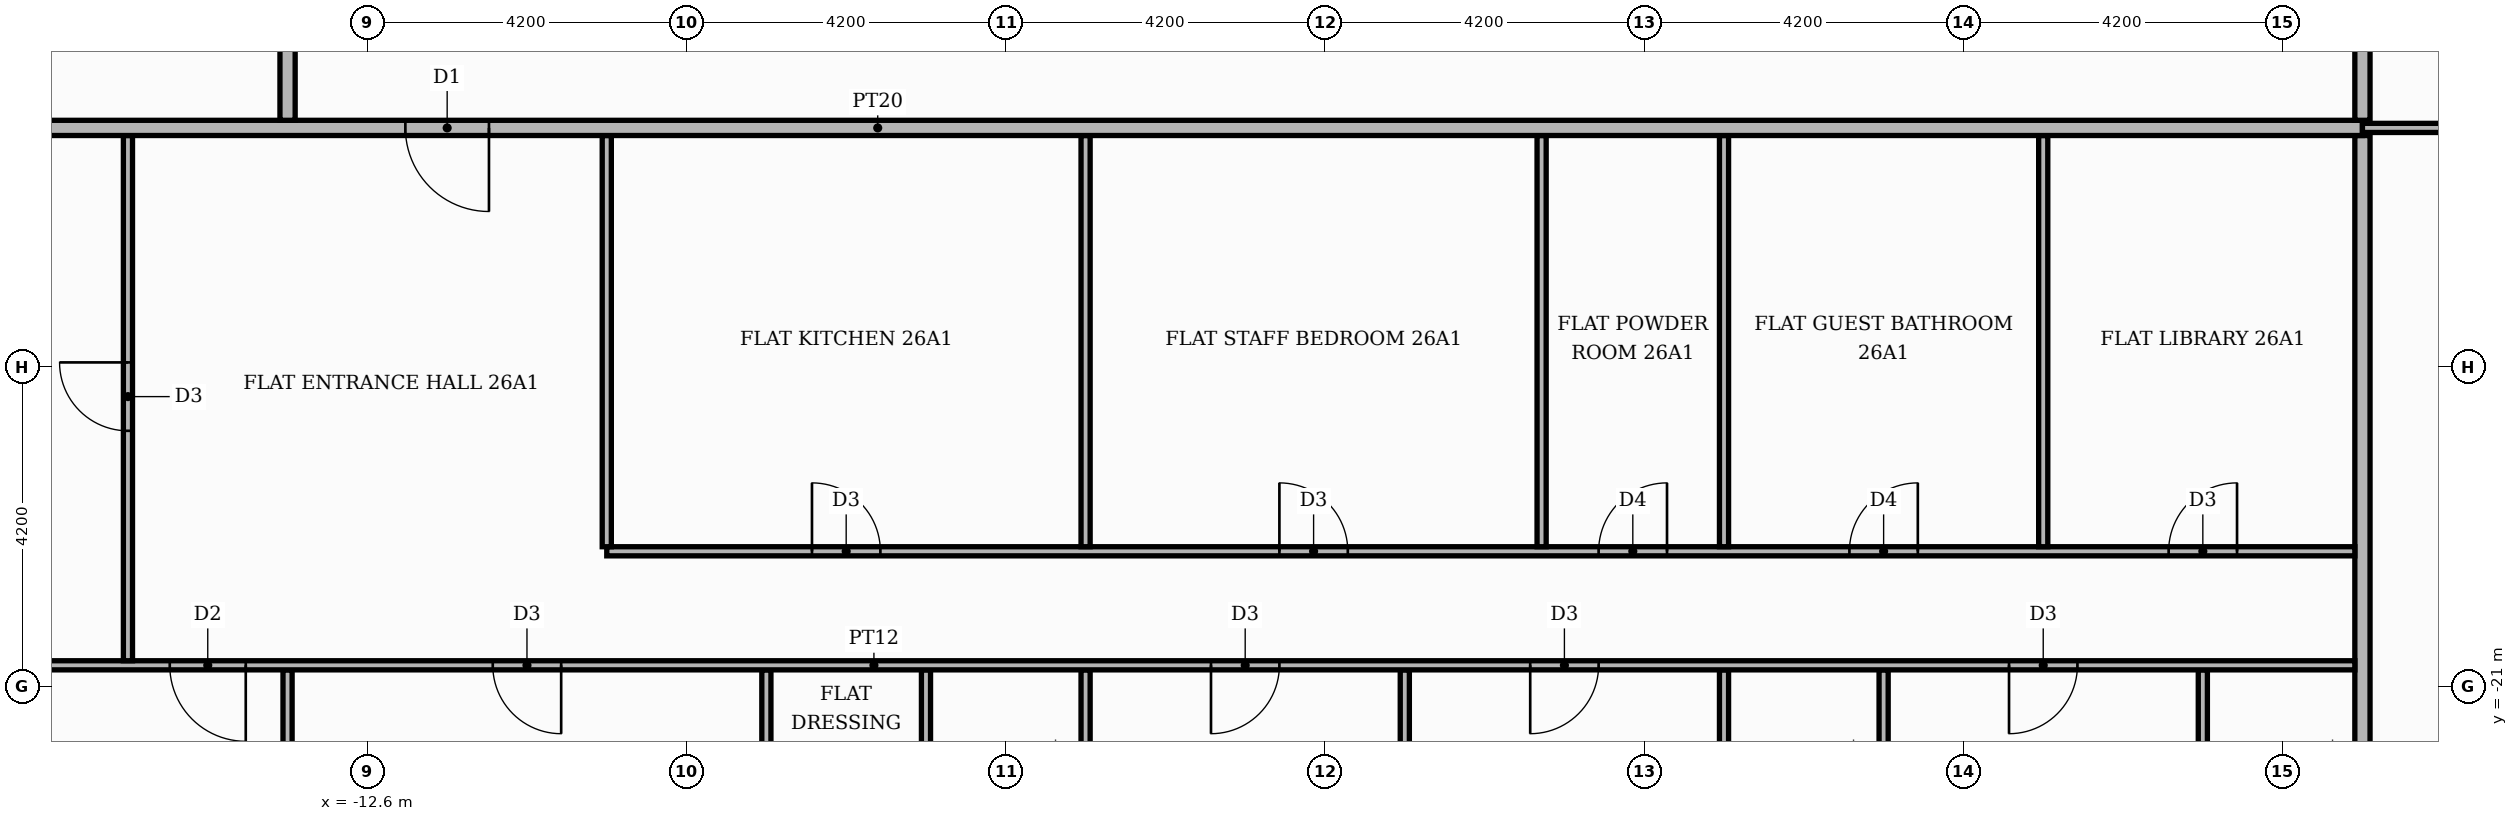
"""IFC4 building model, lengths in metres.
Left out: names, types, materials, properties, quantities, classifications, styles, units other than length and angle.
Written with IfcOpenShell. Run it as: python <this file> out.ifc"""

import sys

from ifc_helpers import new_model, si_unit, direction, frame, frame_2d, origin, place, context, subcontext, project, spatial, rectangle, extrude, element, fill, save


model = new_model("IFC4")
c1 = context("Model", 3, precision=1e-05, world=origin(), true_north=direction((0.0, 1.0)))
c2 = subcontext(c1, "Body", "Model", "MODEL_VIEW")
j1 = project(units=[si_unit("LENGTHUNIT", "METRE"), si_unit("PLANEANGLEUNIT", "RADIAN")], contexts=[c1])
p1 = place(None, origin())
s1 = spatial("IfcSite", under=j1, at=p1, CompositionType="ELEMENT")
p2 = place(p1, origin())
s2 = spatial("IfcBuilding", under=s1, at=p2, CompositionType="ELEMENT")
p3 = place(p2, frame((0.0, 0.0, 110.4)))
s3 = spatial("IfcBuildingStorey", under=s2, at=p3, CompositionType="ELEMENT", Elevation=110.4)
p4 = place(p3, frame((-13.65, -25.42, 0.0), z_axis=(0.0, 0.0, 1.0), x_axis=(0.0, 1.0, 0.0)))
e1 = element("IfcWall", 1, at=p4, inside=s3, PredefinedType="PARTITIONING", context=c2, shape_type="SweptSolid", body=[
    extrude(rectangle(XDim=4.64, YDim=0.12, at=frame_2d((2.32, 0.0))), origin(), (0.0, 0.0, 1.0), 3.48),
])
p5 = place(p3, frame((-7.35, -25.42, 0.0), z_axis=(0.0, 0.0, 1.0), x_axis=(0.0, 1.0, 0.0)))
e2 = element("IfcWall", 2, at=p5, inside=s3, PredefinedType="PARTITIONING", context=c2, shape_type="SweptSolid", body=[
    extrude(rectangle(XDim=4.64, YDim=0.12, at=frame_2d((2.32, 0.0))), origin(), (0.0, 0.0, 1.0), 3.48),
])
p6 = place(p5, frame((1.75, 0.0, 0.0)))
e3 = element("IfcOpeningElement", 3, at=p6, cuts=e2, PredefinedType="OPENING", context=c2, shape_type="SweptSolid", body=[
    extrude(rectangle(XDim=0.9, YDim=2.1, at=frame_2d((0.45, 1.05))), frame((0.0, 0.07, 0.0), z_axis=(0.0, -1.0, 0.0), x_axis=(1.0, 0.0, 0.0)), (0.0, 0.0, 1.0), 0.14),
])
p7 = place(p3, frame((-5.25, -25.42, 0.0), z_axis=(0.0, 0.0, 1.0), x_axis=(0.0, 1.0, 0.0)))
e4 = element("IfcWall", 4, at=p7, inside=s3, PredefinedType="PARTITIONING", context=c2, shape_type="SweptSolid", body=[
    extrude(rectangle(XDim=4.64, YDim=0.12, at=frame_2d((2.32, 0.0))), origin(), (0.0, 0.0, 1.0), 3.48),
])
p8 = place(p7, frame((1.75, 0.0, 0.0)))
e5 = element("IfcOpeningElement", 5, at=p8, cuts=e4, PredefinedType="OPENING", context=c2, shape_type="SweptSolid", body=[
    extrude(rectangle(XDim=0.9, YDim=2.1, at=frame_2d((0.45, 1.05))), frame((0.0, 0.07, 0.0), z_axis=(0.0, -1.0, 0.0), x_axis=(1.0, 0.0, 0.0)), (0.0, 0.0, 1.0), 0.14),
])
for number, where, z_axis, x_axis in (
    (6, (-3.15, -25.42, 0.0), (0.0, 0.0, 1.0), (0.0, 1.0, 0.0)),
    (7, (1.05, -25.42, 0.0), (0.0, 0.0, 1.0), (0.0, 1.0, 0.0)),
):
    element("IfcWall", number, at=place(p3, frame(where, z_axis=z_axis, x_axis=x_axis)), inside=s3, PredefinedType="PARTITIONING", context=c2, shape_type="SweptSolid", body=[
        extrude(rectangle(XDim=4.64, YDim=0.12, at=frame_2d((2.32, 0.0))), origin(), (0.0, 0.0, 1.0), 3.48),
    ])
p9 = place(p3, frame((5.25, -25.42, 0.0), z_axis=(0.0, 0.0, 1.0), x_axis=(0.0, 1.0, 0.0)))
e8 = element("IfcWall", 8, at=p9, inside=s3, PredefinedType="PARTITIONING", context=c2, shape_type="SweptSolid", body=[
    extrude(rectangle(XDim=4.64, YDim=0.12, at=frame_2d((2.32, 0.0))), origin(), (0.0, 0.0, 1.0), 3.48),
])
p10 = place(p9, frame((1.75, 0.0, 0.0)))
e9 = element("IfcOpeningElement", 9, at=p10, cuts=e8, PredefinedType="OPENING", context=c2, shape_type="SweptSolid", body=[
    extrude(rectangle(XDim=0.9, YDim=2.1, at=frame_2d((0.45, 1.05))), frame((0.0, 0.07, 0.0), z_axis=(0.0, -1.0, 0.0), x_axis=(1.0, 0.0, 0.0)), (0.0, 0.0, 1.0), 0.14),
])
p11 = place(p3, frame((7.35, -25.42, 0.0), z_axis=(0.0, 0.0, 1.0), x_axis=(0.0, 1.0, 0.0)))
e10 = element("IfcWall", 10, at=p11, inside=s3, PredefinedType="PARTITIONING", context=c2, shape_type="SweptSolid", body=[
    extrude(rectangle(XDim=4.64, YDim=0.12, at=frame_2d((2.32, 0.0))), origin(), (0.0, 0.0, 1.0), 3.48),
])
p12 = place(p3, frame((11.55, -25.42, 0.0), z_axis=(0.0, 0.0, 1.0), x_axis=(0.0, 1.0, 0.0)))
e11 = element("IfcWall", 11, at=p12, inside=s3, PredefinedType="PARTITIONING", context=c2, shape_type="SweptSolid", body=[
    extrude(rectangle(XDim=4.64, YDim=0.12, at=frame_2d((2.32, 0.0))), origin(), (0.0, 0.0, 1.0), 3.48),
])
p13 = place(p12, frame((1.75, 0.0, 0.0)))
e12 = element("IfcOpeningElement", 12, at=p13, cuts=e11, PredefinedType="OPENING", context=c2, shape_type="SweptSolid", body=[
    extrude(rectangle(XDim=0.9, YDim=2.1, at=frame_2d((0.45, 1.05))), frame((0.0, 0.07, 0.0), z_axis=(0.0, -1.0, 0.0), x_axis=(1.0, 0.0, 0.0)), (0.0, 0.0, 1.0), 0.14),
])
p14 = place(p3, frame((13.65, -25.42, 0.0), z_axis=(0.0, 0.0, 1.0), x_axis=(0.0, 1.0, 0.0)))
e13 = element("IfcWall", 13, at=p14, inside=s3, PredefinedType="PARTITIONING", context=c2, shape_type="SweptSolid", body=[
    extrude(rectangle(XDim=11.67, YDim=0.2, at=frame_2d((5.835, 0.0))), origin(), (0.0, 0.0, 1.0), 3.48),
])
p15 = place(p3, frame((-25.42, -20.72, 0.0), z_axis=(0.0, 0.0, 1.0), x_axis=(1.0, 0.0, 0.0)))
e14 = element("IfcWall", 14, at=p15, inside=s3, PredefinedType="PARTITIONING", context=c2, shape_type="SweptSolid", body=[
    extrude(rectangle(XDim=38.97, YDim=0.12, at=frame_2d((19.485, 0.0))), origin(), (0.0, 0.0, 1.0), 3.48),
])
p16 = place(p15, frame((10.22, 0.0, 0.0)))
e15 = element("IfcOpeningElement", 15, at=p16, cuts=e14, PredefinedType="OPENING", context=c2, shape_type="SweptSolid", body=[
    extrude(rectangle(XDim=1.0, YDim=2.1, at=frame_2d((0.5, 1.05))), frame((0.0, 0.07, 0.0), z_axis=(0.0, -1.0, 0.0), x_axis=(1.0, 0.0, 0.0)), (0.0, 0.0, 1.0), 0.14),
])
p17 = place(p15, frame((14.47, 0.0, 0.0)))
e16 = element("IfcOpeningElement", 16, at=p17, cuts=e14, PredefinedType="OPENING", context=c2, shape_type="SweptSolid", body=[
    extrude(rectangle(XDim=0.9, YDim=2.1, at=frame_2d((0.45, 1.05))), frame((0.0, 0.07, 0.0), z_axis=(0.0, -1.0, 0.0), x_axis=(1.0, 0.0, 0.0)), (0.0, 0.0, 1.0), 0.14),
])
p18 = place(p15, frame((23.92, 0.0, 0.0)))
e17 = element("IfcOpeningElement", 17, at=p18, cuts=e14, PredefinedType="OPENING", context=c2, shape_type="SweptSolid", body=[
    extrude(rectangle(XDim=0.9, YDim=2.1, at=frame_2d((0.45, 1.05))), frame((0.0, 0.07, 0.0), z_axis=(0.0, -1.0, 0.0), x_axis=(1.0, 0.0, 0.0)), (0.0, 0.0, 1.0), 0.14),
])
p19 = place(p15, frame((28.12, 0.0, 0.0)))
e18 = element("IfcOpeningElement", 18, at=p19, cuts=e14, PredefinedType="OPENING", context=c2, shape_type="SweptSolid", body=[
    extrude(rectangle(XDim=0.9, YDim=2.1, at=frame_2d((0.45, 1.05))), frame((0.0, 0.07, 0.0), z_axis=(0.0, -1.0, 0.0), x_axis=(1.0, 0.0, 0.0)), (0.0, 0.0, 1.0), 0.14),
])
p20 = place(p15, frame((34.42, 0.0, 0.0)))
e19 = element("IfcOpeningElement", 19, at=p20, cuts=e14, PredefinedType="OPENING", context=c2, shape_type="SweptSolid", body=[
    extrude(rectangle(XDim=0.9, YDim=2.1, at=frame_2d((0.45, 1.05))), frame((0.0, 0.07, 0.0), z_axis=(0.0, -1.0, 0.0), x_axis=(1.0, 0.0, 0.0)), (0.0, 0.0, 1.0), 0.14),
])
p21 = place(p3, frame((-15.75, -20.66, 0.0), z_axis=(0.0, 0.0, 1.0), x_axis=(0.0, 1.0, 0.0)))
e20 = element("IfcWall", 20, at=p21, inside=s3, PredefinedType="PARTITIONING", context=c2, shape_type="SweptSolid", body=[
    extrude(rectangle(XDim=6.91, YDim=0.12, at=frame_2d((3.455, 0.0))), origin(), (0.0, 0.0, 1.0), 3.48),
])
p22 = place(p21, frame((3.025, 0.0, 0.0)))
e21 = element("IfcOpeningElement", 21, at=p22, cuts=e20, PredefinedType="OPENING", context=c2, shape_type="SweptSolid", body=[
    extrude(rectangle(XDim=0.9, YDim=2.1, at=frame_2d((0.45, 1.05))), frame((0.0, 0.07, 0.0), z_axis=(0.0, -1.0, 0.0), x_axis=(1.0, 0.0, 0.0)), (0.0, 0.0, 1.0), 0.14),
])
p23 = place(p3, frame((-9.45, -19.22, 0.0), z_axis=(0.0, 0.0, 1.0), x_axis=(1.0, 0.0, 0.0)))
e22 = element("IfcWall", 22, at=p23, inside=s3, PredefinedType="PARTITIONING", context=c2, shape_type="SweptSolid", body=[
    extrude(rectangle(XDim=23.0, YDim=0.12, at=frame_2d((11.5, 0.0))), origin(), (0.0, 0.0, 1.0), 3.48),
])
p24 = place(p23, frame((2.7, 0.0, 0.0)))
e23 = element("IfcOpeningElement", 23, at=p24, cuts=e22, PredefinedType="OPENING", context=c2, shape_type="SweptSolid", body=[
    extrude(rectangle(XDim=0.9, YDim=2.1, at=frame_2d((0.45, 1.05))), frame((0.0, 0.07, 0.0), z_axis=(0.0, -1.0, 0.0), x_axis=(1.0, 0.0, 0.0)), (0.0, 0.0, 1.0), 0.14),
])
p25 = place(p23, frame((8.85, 0.0, 0.0)))
e24 = element("IfcOpeningElement", 24, at=p25, cuts=e22, PredefinedType="OPENING", context=c2, shape_type="SweptSolid", body=[
    extrude(rectangle(XDim=0.9, YDim=2.1, at=frame_2d((0.45, 1.05))), frame((0.0, 0.07, 0.0), z_axis=(0.0, -1.0, 0.0), x_axis=(1.0, 0.0, 0.0)), (0.0, 0.0, 1.0), 0.14),
])
p26 = place(p23, frame((13.05, 0.0, 0.0)))
e25 = element("IfcOpeningElement", 25, at=p26, cuts=e22, PredefinedType="OPENING", context=c2, shape_type="SweptSolid", body=[
    extrude(rectangle(XDim=0.9, YDim=2.1, at=frame_2d((0.45, 1.05))), frame((0.0, 0.07, 0.0), z_axis=(0.0, -1.0, 0.0), x_axis=(1.0, 0.0, 0.0)), (0.0, 0.0, 1.0), 0.14),
])
p27 = place(p23, frame((16.35, 0.0, 0.0)))
e26 = element("IfcOpeningElement", 26, at=p27, cuts=e22, PredefinedType="OPENING", context=c2, shape_type="SweptSolid", body=[
    extrude(rectangle(XDim=0.9, YDim=2.1, at=frame_2d((0.45, 1.05))), frame((0.0, 0.07, 0.0), z_axis=(0.0, -1.0, 0.0), x_axis=(1.0, 0.0, 0.0)), (0.0, 0.0, 1.0), 0.14),
])
p28 = place(p23, frame((20.55, 0.0, 0.0)))
e27 = element("IfcOpeningElement", 27, at=p28, cuts=e22, PredefinedType="OPENING", context=c2, shape_type="SweptSolid", body=[
    extrude(rectangle(XDim=0.9, YDim=2.1, at=frame_2d((0.45, 1.05))), frame((0.0, 0.07, 0.0), z_axis=(0.0, -1.0, 0.0), x_axis=(1.0, 0.0, 0.0)), (0.0, 0.0, 1.0), 0.14),
])
for number, where, z_axis, x_axis in (
    (28, (-9.45, -19.16, 0.0), (0.0, 0.0, 1.0), (0.0, 1.0, 0.0)),
    (29, (-3.15, -19.16, 0.0), (0.0, 0.0, 1.0), (0.0, 1.0, 0.0)),
    (30, (2.85, -19.16, 0.0), (0.0, 0.0, 1.0), (0.0, 1.0, 0.0)),
    (31, (5.25, -19.16, 0.0), (0.0, 0.0, 1.0), (0.0, 1.0, 0.0)),
    (32, (9.45, -19.16, 0.0), (0.0, 0.0, 1.0), (0.0, 1.0, 0.0)),
):
    element("IfcWall", number, at=place(p3, frame(where, z_axis=z_axis, x_axis=x_axis)), inside=s3, PredefinedType="PARTITIONING", context=c2, shape_type="SweptSolid", body=[
        extrude(rectangle(XDim=5.41, YDim=0.12, at=frame_2d((2.705, 0.0))), origin(), (0.0, 0.0, 1.0), 3.48),
    ])
p29 = place(p3, frame((-25.42, -13.65, 0.0), z_axis=(0.0, 0.0, 1.0), x_axis=(1.0, 0.0, 0.0)))
e33 = element("IfcWall", 33, at=p29, inside=s3, PredefinedType="PARTITIONING", context=c2, shape_type="SweptSolid", body=[
    extrude(rectangle(XDim=39.07, YDim=0.2, at=frame_2d((19.535, 0.0))), origin(), (0.0, 0.0, 1.0), 3.48),
])
p30 = place(p29, frame((13.32, 0.0, 0.0)))
e34 = element("IfcOpeningElement", 34, at=p30, cuts=e33, PredefinedType="OPENING", context=c2, shape_type="SweptSolid", body=[
    extrude(rectangle(XDim=1.1, YDim=2.4, at=frame_2d((0.55, 1.2))), frame((0.0, 0.11, 0.0), z_axis=(0.0, -1.0, 0.0), x_axis=(1.0, 0.0, 0.0)), (0.0, 0.0, 1.0), 0.22),
])
p31 = place(p3, frame((13.65, -13.65, 0.0), z_axis=(0.0, 0.0, 1.0), x_axis=(1.0, 0.0, 0.0)))
e35 = element("IfcWall", 35, at=p31, inside=s3, PredefinedType="PARTITIONING", context=c2, shape_type="SweptSolid", body=[
    extrude(rectangle(XDim=6.77, YDim=0.12, at=frame_2d((3.385, 0.0))), origin(), (0.0, 0.0, 1.0), 3.48),
])
p32 = place(p31, frame((2.935, 0.0, 0.0)))
e36 = element("IfcOpeningElement", 36, at=p32, cuts=e35, PredefinedType="OPENING", context=c2, shape_type="SweptSolid", body=[
    extrude(rectangle(XDim=0.9, YDim=2.1, at=frame_2d((0.45, 1.05))), frame((0.0, 0.07, 0.0), z_axis=(0.0, -1.0, 0.0), x_axis=(1.0, 0.0, 0.0)), (0.0, 0.0, 1.0), 0.14),
])
p33 = place(p3, frame((-13.65, -13.55, 0.0), z_axis=(0.0, 0.0, 1.0), x_axis=(0.0, 1.0, 0.0)))
e37 = element("IfcWall", 37, at=p33, inside=s3, PredefinedType="PARTITIONING", context=c2, shape_type="SweptSolid", body=[
    extrude(rectangle(XDim=18.7, YDim=0.2, at=frame_2d((9.35, 0.0))), origin(), (0.0, 0.0, 1.0), 3.48),
])
p34 = place(p33, frame((14.05, 0.0, 0.0)))
e38 = element("IfcOpeningElement", 38, at=p34, cuts=e37, PredefinedType="OPENING", context=c2, shape_type="SweptSolid", body=[
    extrude(rectangle(XDim=1.1, YDim=2.4, at=frame_2d((0.55, 1.2))), frame((0.0, 0.11, 0.0), z_axis=(0.0, -1.0, 0.0), x_axis=(1.0, 0.0, 0.0)), (0.0, 0.0, 1.0), 0.22),
])
p35 = place(p3, frame((13.65, -13.55, 0.0), z_axis=(0.0, 0.0, 1.0), x_axis=(0.0, 1.0, 0.0)))
e39 = element("IfcWall", 39, at=p35, inside=s3, PredefinedType="PARTITIONING", context=c2, shape_type="SweptSolid", body=[
    extrude(rectangle(XDim=27.1, YDim=0.2, at=frame_2d((13.55, 0.0))), origin(), (0.0, 0.0, 1.0), 3.48),
])
p36 = place(p35, frame((2.5, 0.0, 0.0)))
e40 = element("IfcOpeningElement", 40, at=p36, cuts=e39, PredefinedType="OPENING", context=c2, shape_type="SweptSolid", body=[
    extrude(rectangle(XDim=1.1, YDim=2.4, at=frame_2d((0.55, 1.2))), frame((0.0, 0.11, 0.0), z_axis=(0.0, -1.0, 0.0), x_axis=(1.0, 0.0, 0.0)), (0.0, 0.0, 1.0), 0.22),
])
p37 = place(p30, frame((1.1, 0.0, 0.0), z_axis=(0.0, 0.0, 1.0), x_axis=(-1.0, 0.0, 0.0)))
e41 = element("IfcDoor", 41, at=p37, inside=s3, OperationType="SINGLE_SWING_RIGHT", PredefinedType="DOOR", context=c2, shape_type="SweptSolid", body=[
    extrude(rectangle(XDim=1.1, YDim=2.4, at=frame_2d((0.55, 1.2))), frame((0.0, 0.025, 0.0), z_axis=(0.0, -1.0, 0.0), x_axis=(1.0, 0.0, 0.0)), (0.0, 0.0, 1.0), 0.05),
])
fill(e34, e41)
p38 = place(p22, origin())
e42 = element("IfcDoor", 42, at=p38, inside=s3, OperationType="SINGLE_SWING_RIGHT", PredefinedType="DOOR", context=c2, shape_type="SweptSolid", body=[
    extrude(rectangle(XDim=0.9, YDim=2.1, at=frame_2d((0.45, 1.05))), frame((0.0, 0.025, 0.0), z_axis=(0.0, -1.0, 0.0), x_axis=(1.0, 0.0, 0.0)), (0.0, 0.0, 1.0), 0.05),
])
fill(e21, e42)
p39 = place(p24, origin())
e43 = element("IfcDoor", 43, at=p39, inside=s3, OperationType="SINGLE_SWING_LEFT", PredefinedType="DOOR", context=c2, shape_type="SweptSolid", body=[
    extrude(rectangle(XDim=0.9, YDim=2.1, at=frame_2d((0.45, 1.05))), frame((0.0, 0.025, 0.0), z_axis=(0.0, -1.0, 0.0), x_axis=(1.0, 0.0, 0.0)), (0.0, 0.0, 1.0), 0.05),
])
fill(e23, e43)
p40 = place(p25, origin())
e44 = element("IfcDoor", 44, at=p40, inside=s3, OperationType="SINGLE_SWING_LEFT", PredefinedType="DOOR", context=c2, shape_type="SweptSolid", body=[
    extrude(rectangle(XDim=0.9, YDim=2.1, at=frame_2d((0.45, 1.05))), frame((0.0, 0.025, 0.0), z_axis=(0.0, -1.0, 0.0), x_axis=(1.0, 0.0, 0.0)), (0.0, 0.0, 1.0), 0.05),
])
fill(e24, e44)
p41 = place(p26, origin())
e45 = element("IfcDoor", 45, at=p41, inside=s3, OperationType="SINGLE_SWING_RIGHT", PredefinedType="DOOR", context=c2, shape_type="SweptSolid", body=[
    extrude(rectangle(XDim=0.9, YDim=2.1, at=frame_2d((0.45, 1.05))), frame((0.0, 0.025, 0.0), z_axis=(0.0, -1.0, 0.0), x_axis=(1.0, 0.0, 0.0)), (0.0, 0.0, 1.0), 0.05),
])
fill(e25, e45)
p42 = place(p27, origin())
e46 = element("IfcDoor", 46, at=p42, inside=s3, OperationType="SINGLE_SWING_RIGHT", PredefinedType="DOOR", context=c2, shape_type="SweptSolid", body=[
    extrude(rectangle(XDim=0.9, YDim=2.1, at=frame_2d((0.45, 1.05))), frame((0.0, 0.025, 0.0), z_axis=(0.0, -1.0, 0.0), x_axis=(1.0, 0.0, 0.0)), (0.0, 0.0, 1.0), 0.05),
])
fill(e26, e46)
p43 = place(p28, origin())
e47 = element("IfcDoor", 47, at=p43, inside=s3, OperationType="SINGLE_SWING_RIGHT", PredefinedType="DOOR", context=c2, shape_type="SweptSolid", body=[
    extrude(rectangle(XDim=0.9, YDim=2.1, at=frame_2d((0.45, 1.05))), frame((0.0, 0.025, 0.0), z_axis=(0.0, -1.0, 0.0), x_axis=(1.0, 0.0, 0.0)), (0.0, 0.0, 1.0), 0.05),
])
fill(e27, e47)
p44 = place(p16, frame((1.0, 0.0, 0.0), z_axis=(0.0, 0.0, 1.0), x_axis=(-1.0, 0.0, 0.0)))
e48 = element("IfcDoor", 48, at=p44, inside=s3, OperationType="SINGLE_SWING_RIGHT", PredefinedType="DOOR", context=c2, shape_type="SweptSolid", body=[
    extrude(rectangle(XDim=1.0, YDim=2.1, at=frame_2d((0.5, 1.05))), frame((0.0, 0.025, 0.0), z_axis=(0.0, -1.0, 0.0), x_axis=(1.0, 0.0, 0.0)), (0.0, 0.0, 1.0), 0.05),
])
fill(e15, e48)
p45 = place(p17, frame((0.9, 0.0, 0.0), z_axis=(0.0, 0.0, 1.0), x_axis=(-1.0, 0.0, 0.0)))
e49 = element("IfcDoor", 49, at=p45, inside=s3, OperationType="SINGLE_SWING_RIGHT", PredefinedType="DOOR", context=c2, shape_type="SweptSolid", body=[
    extrude(rectangle(XDim=0.9, YDim=2.1, at=frame_2d((0.45, 1.05))), frame((0.0, 0.025, 0.0), z_axis=(0.0, -1.0, 0.0), x_axis=(1.0, 0.0, 0.0)), (0.0, 0.0, 1.0), 0.05),
])
fill(e16, e49)
p46 = place(p18, frame((0.9, 0.0, 0.0), z_axis=(0.0, 0.0, 1.0), x_axis=(-1.0, 0.0, 0.0)))
e50 = element("IfcDoor", 50, at=p46, inside=s3, OperationType="SINGLE_SWING_LEFT", PredefinedType="DOOR", context=c2, shape_type="SweptSolid", body=[
    extrude(rectangle(XDim=0.9, YDim=2.1, at=frame_2d((0.45, 1.05))), frame((0.0, 0.025, 0.0), z_axis=(0.0, -1.0, 0.0), x_axis=(1.0, 0.0, 0.0)), (0.0, 0.0, 1.0), 0.05),
])
fill(e17, e50)
p47 = place(p19, frame((0.9, 0.0, 0.0), z_axis=(0.0, 0.0, 1.0), x_axis=(-1.0, 0.0, 0.0)))
e51 = element("IfcDoor", 51, at=p47, inside=s3, OperationType="SINGLE_SWING_LEFT", PredefinedType="DOOR", context=c2, shape_type="SweptSolid", body=[
    extrude(rectangle(XDim=0.9, YDim=2.1, at=frame_2d((0.45, 1.05))), frame((0.0, 0.025, 0.0), z_axis=(0.0, -1.0, 0.0), x_axis=(1.0, 0.0, 0.0)), (0.0, 0.0, 1.0), 0.05),
])
fill(e18, e51)
p48 = place(p20, frame((0.9, 0.0, 0.0), z_axis=(0.0, 0.0, 1.0), x_axis=(-1.0, 0.0, 0.0)))
e52 = element("IfcDoor", 52, at=p48, inside=s3, OperationType="SINGLE_SWING_LEFT", PredefinedType="DOOR", context=c2, shape_type="SweptSolid", body=[
    extrude(rectangle(XDim=0.9, YDim=2.1, at=frame_2d((0.45, 1.05))), frame((0.0, 0.025, 0.0), z_axis=(0.0, -1.0, 0.0), x_axis=(1.0, 0.0, 0.0)), (0.0, 0.0, 1.0), 0.05),
])
fill(e19, e52)
save(model, sys.argv[1])
